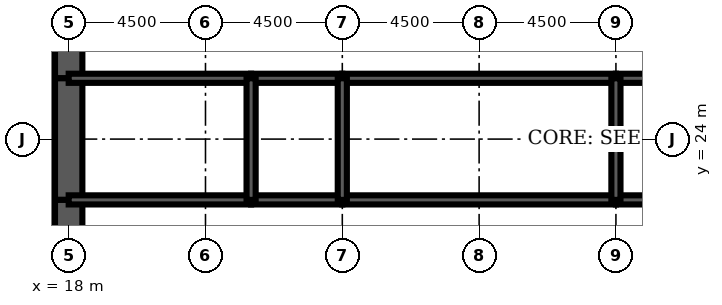
"""IFC4 building model, lengths in metres.
Left out: names, types, materials, properties, quantities, classifications, styles, units other than length and angle.
Written with IfcOpenShell. Run it as: python <this file> out.ifc"""

import sys

from ifc_helpers import new_model, si_unit, direction, frame, frame_2d, origin, place, context, subcontext, project, spatial, rectangle, extrude, element, fill, save


model = new_model("IFC4")
c1 = context("Model", 3, precision=1e-05, world=origin(), true_north=direction((0.0, 1.0)))
c2 = subcontext(c1, "Body", "Model", "MODEL_VIEW")
j1 = project(units=[si_unit("LENGTHUNIT", "METRE"), si_unit("PLANEANGLEUNIT", "RADIAN")], contexts=[c1])
p1 = place(None, origin())
s1 = spatial("IfcSite", under=j1, at=p1, CompositionType="ELEMENT")
p2 = place(p1, origin())
s2 = spatial("IfcBuilding", under=s1, at=p2, CompositionType="ELEMENT")
p3 = place(p2, origin())
s3 = spatial("IfcBuildingStorey", under=s2, at=p3, CompositionType="ELEMENT", Elevation=0.0)
p4 = place(p3, frame((18.0, 28.8, 0.0), z_axis=(0.0, 0.0, 1.0), x_axis=(0.0, -1.0, 0.0)))
e1 = element("IfcWall", 1, at=p4, inside=s3, PredefinedType="SHEAR", context=c2, shape_type="SweptSolid", body=[
    extrude(rectangle(XDim=2.8, YDim=0.9, at=frame_2d((1.4, 0.0))), origin(), (0.0, 0.0, 1.0), 6.0),
])
p5 = place(p4, frame((0.4, 0.0, 0.0)))
e2 = element("IfcOpeningElement", 2, at=p5, cuts=e1, PredefinedType="OPENING", context=c2, shape_type="SweptSolid", body=[
    extrude(rectangle(XDim=1.8, YDim=2.1, at=frame_2d((0.9, 1.05))), frame((0.0, 0.46, 0.0), z_axis=(0.0, -1.0, 0.0), x_axis=(1.0, 0.0, 0.0)), (0.0, 0.0, 1.0), 0.92),
])
p6 = place(p3, frame((18.0, 26.0, 0.0), z_axis=(0.0, 0.0, 1.0), x_axis=(0.0, -1.0, 0.0)))
e3 = element("IfcWall", 3, at=p6, inside=s3, PredefinedType="SHEAR", context=c2, shape_type="SweptSolid", body=[
    extrude(rectangle(XDim=4.0, YDim=0.9, at=frame_2d((2.0, 0.0))), origin(), (0.0, 0.0, 1.0), 6.0),
])
p7 = place(p3, frame((18.0, 22.0, 0.0), z_axis=(0.0, 0.0, 1.0), x_axis=(0.0, -1.0, 0.0)))
e4 = element("IfcWall", 4, at=p7, inside=s3, PredefinedType="SHEAR", context=c2, shape_type="SweptSolid", body=[
    extrude(rectangle(XDim=2.8, YDim=0.9, at=frame_2d((1.4, 0.0))), origin(), (0.0, 0.0, 1.0), 6.0),
])
p8 = place(p7, frame((0.6, 0.0, 0.0)))
e5 = element("IfcOpeningElement", 5, at=p8, cuts=e4, PredefinedType="OPENING", context=c2, shape_type="SweptSolid", body=[
    extrude(rectangle(XDim=1.8, YDim=2.1, at=frame_2d((0.9, 1.05))), frame((0.0, 0.46, 0.0), z_axis=(0.0, -1.0, 0.0), x_axis=(1.0, 0.0, 0.0)), (0.0, 0.0, 1.0), 0.92),
])
p9 = place(p3, frame((18.0, 22.0, 0.0), z_axis=(0.0, 0.0, 1.0), x_axis=(1.0, 0.0, 0.0)))
e6 = element("IfcWall", 6, at=p9, inside=s3, PredefinedType="SOLIDWALL", context=c2, shape_type="SweptSolid", body=[
    extrude(rectangle(XDim=6.0, YDim=0.3, at=frame_2d((3.0, 0.0))), origin(), (0.0, 0.0, 1.0), 6.0),
])
p10 = place(p9, frame((2.0, 0.0, 0.0)))
e7 = element("IfcOpeningElement", 7, at=p10, cuts=e6, PredefinedType="OPENING", context=c2, shape_type="SweptSolid", body=[
    extrude(rectangle(XDim=1.0, YDim=2.1, at=frame_2d((0.5, 1.05))), frame((0.0, 0.16, 0.0), z_axis=(0.0, -1.0, 0.0), x_axis=(1.0, 0.0, 0.0)), (0.0, 0.0, 1.0), 0.32),
])
p11 = place(p3, frame((24.0, 22.0, 0.0), z_axis=(0.0, 0.0, 1.0), x_axis=(1.0, 0.0, 0.0)))
e8 = element("IfcWall", 8, at=p11, inside=s3, PredefinedType="SOLIDWALL", context=c2, shape_type="SweptSolid", body=[
    extrude(rectangle(XDim=3.0, YDim=0.3, at=frame_2d((1.5, 0.0))), origin(), (0.0, 0.0, 1.0), 6.0),
])
p12 = place(p11, frame((1.0, 0.0, 0.0)))
e9 = element("IfcOpeningElement", 9, at=p12, cuts=e8, PredefinedType="OPENING", context=c2, shape_type="SweptSolid", body=[
    extrude(rectangle(XDim=1.0, YDim=2.1, at=frame_2d((0.5, 1.05))), frame((0.0, 0.16, 0.0), z_axis=(0.0, -1.0, 0.0), x_axis=(1.0, 0.0, 0.0)), (0.0, 0.0, 1.0), 0.32),
])
p13 = place(p3, frame((27.0, 22.0, 0.0), z_axis=(0.0, 0.0, 1.0), x_axis=(1.0, 0.0, 0.0)))
e10 = element("IfcWall", 10, at=p13, inside=s3, PredefinedType="SOLIDWALL", context=c2, shape_type="SweptSolid", body=[
    extrude(rectangle(XDim=9.0, YDim=0.3, at=frame_2d((4.5, 0.0))), origin(), (0.0, 0.0, 1.0), 6.0),
])
p14 = place(p13, frame((4.0, 0.0, 0.0)))
e11 = element("IfcOpeningElement", 11, at=p14, cuts=e10, PredefinedType="OPENING", context=c2, shape_type="SweptSolid", body=[
    extrude(rectangle(XDim=1.0, YDim=2.1, at=frame_2d((0.5, 1.05))), frame((0.0, 0.16, 0.0), z_axis=(0.0, -1.0, 0.0), x_axis=(1.0, 0.0, 0.0)), (0.0, 0.0, 1.0), 0.32),
])
p15 = place(p3, frame((36.0, 22.0, 0.0), z_axis=(0.0, 0.0, 1.0), x_axis=(1.0, 0.0, 0.0)))
e12 = element("IfcWall", 12, at=p15, inside=s3, PredefinedType="SOLIDWALL", context=c2, shape_type="SweptSolid", body=[
    extrude(rectangle(XDim=9.0, YDim=0.3, at=frame_2d((4.5, 0.0))), origin(), (0.0, 0.0, 1.0), 6.0),
])
p16 = place(p15, frame((4.0, 0.0, 0.0)))
e13 = element("IfcOpeningElement", 13, at=p16, cuts=e12, PredefinedType="OPENING", context=c2, shape_type="SweptSolid", body=[
    extrude(rectangle(XDim=1.0, YDim=2.1, at=frame_2d((0.5, 1.05))), frame((0.0, 0.16, 0.0), z_axis=(0.0, -1.0, 0.0), x_axis=(1.0, 0.0, 0.0)), (0.0, 0.0, 1.0), 0.32),
])
p17 = place(p3, frame((18.0, 26.0, 0.0), z_axis=(0.0, 0.0, 1.0), x_axis=(1.0, 0.0, 0.0)))
e14 = element("IfcWall", 14, at=p17, inside=s3, PredefinedType="SOLIDWALL", context=c2, shape_type="SweptSolid", body=[
    extrude(rectangle(XDim=6.0, YDim=0.3, at=frame_2d((3.0, 0.0))), origin(), (0.0, 0.0, 1.0), 6.0),
])
p18 = place(p3, frame((24.0, 26.0, 0.0), z_axis=(0.0, 0.0, 1.0), x_axis=(1.0, 0.0, 0.0)))
e15 = element("IfcWall", 15, at=p18, inside=s3, PredefinedType="SOLIDWALL", context=c2, shape_type="SweptSolid", body=[
    extrude(rectangle(XDim=3.0, YDim=0.3, at=frame_2d((1.5, 0.0))), origin(), (0.0, 0.0, 1.0), 6.0),
])
for number, where, z_axis, x_axis in (
    (16, (27.0, 26.0, 0.0), (0.0, 0.0, 1.0), (1.0, 0.0, 0.0)),
    (17, (36.0, 26.0, 0.0), (0.0, 0.0, 1.0), (1.0, 0.0, 0.0)),
):
    element("IfcWall", number, at=place(p3, frame(where, z_axis=z_axis, x_axis=x_axis)), inside=s3, PredefinedType="SOLIDWALL", context=c2, shape_type="SweptSolid", body=[
        extrude(rectangle(XDim=9.0, YDim=0.3, at=frame_2d((4.5, 0.0))), origin(), (0.0, 0.0, 1.0), 6.0),
    ])
for number, where, z_axis, x_axis in (
    (18, (24.0, 22.0, 0.0), (0.0, 0.0, 1.0), (0.0, 1.0, 0.0)),
    (19, (27.0, 22.0, 0.0), (0.0, 0.0, 1.0), (0.0, 1.0, 0.0)),
    (20, (36.0, 22.0, 0.0), (0.0, 0.0, 1.0), (0.0, 1.0, 0.0)),
):
    element("IfcWall", number, at=place(p3, frame(where, z_axis=z_axis, x_axis=x_axis)), inside=s3, PredefinedType="SOLIDWALL", context=c2, shape_type="SweptSolid", body=[
        extrude(rectangle(XDim=4.0, YDim=0.3, at=frame_2d((2.0, 0.0))), origin(), (0.0, 0.0, 1.0), 6.0),
    ])
p19 = place(p8, origin())
e21 = element("IfcDoor", 21, at=p19, inside=s3, OperationType="SINGLE_SWING_LEFT", PredefinedType="DOOR", context=c2, shape_type="SweptSolid", body=[
    extrude(rectangle(XDim=1.8, YDim=2.1, at=frame_2d((0.9, 1.05))), frame((0.0, 0.45, 0.0), z_axis=(0.0, -1.0, 0.0), x_axis=(1.0, 0.0, 0.0)), (0.0, 0.0, 1.0), 0.899),
])
fill(e5, e21)
p20 = place(p5, origin())
e22 = element("IfcDoor", 22, at=p20, inside=s3, OperationType="SINGLE_SWING_LEFT", PredefinedType="DOOR", context=c2, shape_type="SweptSolid", body=[
    extrude(rectangle(XDim=1.8, YDim=2.1, at=frame_2d((0.9, 1.05))), frame((0.0, 0.45, 0.0), z_axis=(0.0, -1.0, 0.0), x_axis=(1.0, 0.0, 0.0)), (0.0, 0.0, 1.0), 0.899),
])
fill(e2, e22)
p21 = place(p10, origin())
e23 = element("IfcDoor", 23, at=p21, inside=s3, OperationType="SINGLE_SWING_LEFT", PredefinedType="DOOR", context=c2, shape_type="SweptSolid", body=[
    extrude(rectangle(XDim=1.0, YDim=2.1, at=frame_2d((0.5, 1.05))), frame((0.0, 0.025, 0.0), z_axis=(0.0, -1.0, 0.0), x_axis=(1.0, 0.0, 0.0)), (0.0, 0.0, 1.0), 0.05),
])
fill(e7, e23)
p22 = place(p12, origin())
e24 = element("IfcDoor", 24, at=p22, inside=s3, OperationType="SINGLE_SWING_LEFT", PredefinedType="DOOR", context=c2, shape_type="SweptSolid", body=[
    extrude(rectangle(XDim=1.0, YDim=2.1, at=frame_2d((0.5, 1.05))), frame((0.0, 0.025, 0.0), z_axis=(0.0, -1.0, 0.0), x_axis=(1.0, 0.0, 0.0)), (0.0, 0.0, 1.0), 0.05),
])
fill(e9, e24)
p23 = place(p14, origin())
e25 = element("IfcDoor", 25, at=p23, inside=s3, OperationType="SINGLE_SWING_LEFT", PredefinedType="DOOR", context=c2, shape_type="SweptSolid", body=[
    extrude(rectangle(XDim=1.0, YDim=2.1, at=frame_2d((0.5, 1.05))), frame((0.0, 0.025, 0.0), z_axis=(0.0, -1.0, 0.0), x_axis=(1.0, 0.0, 0.0)), (0.0, 0.0, 1.0), 0.05),
])
fill(e11, e25)
save(model, sys.argv[1])
